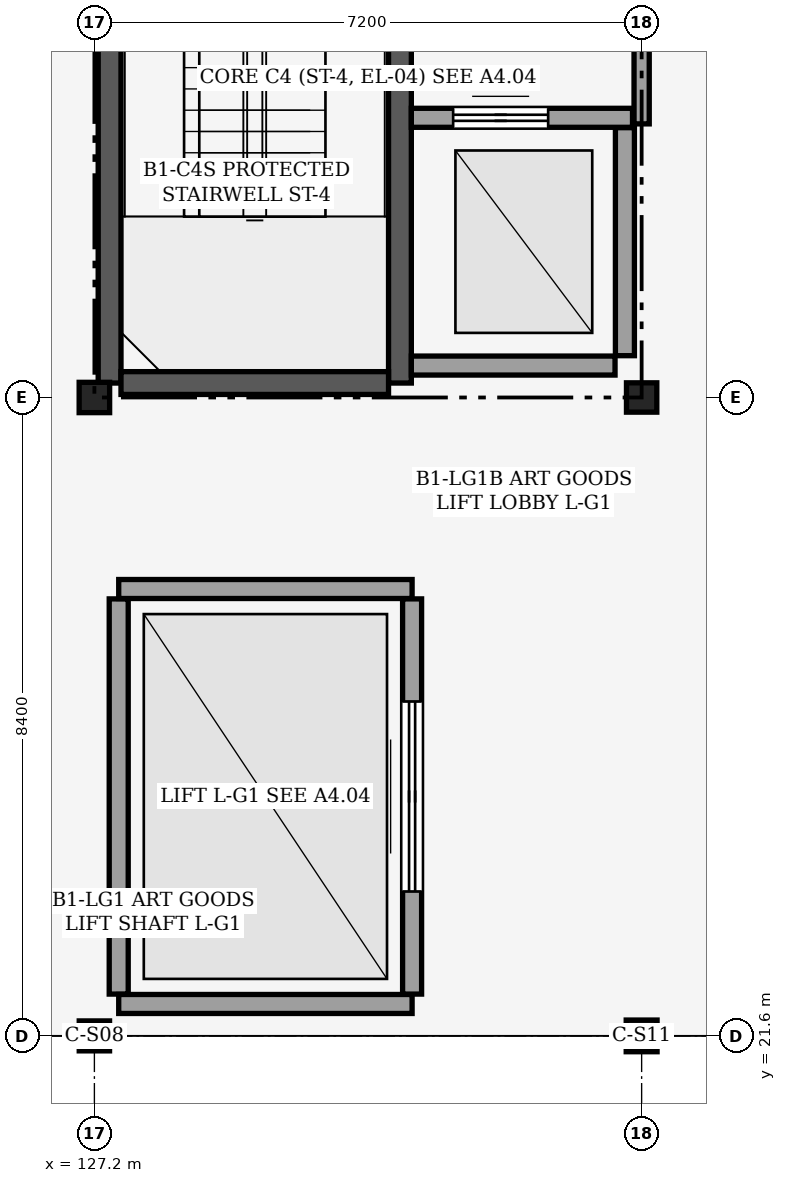
"""IFC4 building model, lengths in metres.
Left out: names, types, materials, properties, quantities, classifications, styles, units other than length and angle.
Written with IfcOpenShell. Run it as: python <this file> out.ifc"""

import sys

from ifc_helpers import new_model, si_unit, direction, frame, frame_2d, origin, origin_2d, place, context, subcontext, project, spatial, rectangle, i_section, extrude, element, fill, save


model = new_model("IFC4")
c1 = context("Model", 3, precision=1e-05, world=origin(), true_north=direction((0.0, 1.0)))
c2 = subcontext(c1, "Body", "Model", "MODEL_VIEW")
j1 = project(units=[si_unit("LENGTHUNIT", "METRE"), si_unit("PLANEANGLEUNIT", "RADIAN")], contexts=[c1])
p1 = place(None, origin())
s1 = spatial("IfcSite", under=j1, at=p1, CompositionType="ELEMENT")
p2 = place(p1, origin())
s2 = spatial("IfcBuilding", under=s1, at=p2, CompositionType="ELEMENT")
p3 = place(p2, frame((0.0, 0.0, -5.4)))
s3 = spatial("IfcBuildingStorey", under=s2, at=p3, CompositionType="ELEMENT", Elevation=-5.4)
p4 = place(p3, frame((127.2, 21.6, 0.0), z_axis=(0.0, 0.0, 1.0), x_axis=(1.0, 0.0, 0.0)))
e1 = element("IfcColumn", 1, at=p4, inside=s3, PredefinedType="COLUMN", context=c2, shape_type="SweptSolid", body=[
    extrude(i_section(OverallWidth=0.399, OverallDepth=0.394, WebThickness=0.023, FlangeThickness=0.037, FilletRadius=0.025, at=origin_2d()), origin(), (0.0, 0.0, 1.0), 5.4),
])
p5 = place(p3, frame((127.2, 30.0, 0.0), z_axis=(0.0, 0.0, 1.0), x_axis=(1.0, 0.0, 0.0)))
e2 = element("IfcColumn", 2, at=p5, inside=s3, PredefinedType="COLUMN", context=c2, shape_type="SweptSolid", body=[
    extrude(i_section(OverallWidth=0.401, OverallDepth=0.399, WebThickness=0.025, FlangeThickness=0.04, FilletRadius=0.025, at=origin_2d()), origin(), (0.0, 0.0, 1.0), 5.4),
])
p6 = place(p3, frame((134.4, 21.6, 0.0), z_axis=(0.0, 0.0, 1.0), x_axis=(1.0, 0.0, 0.0)))
e3 = element("IfcColumn", 3, at=p6, inside=s3, PredefinedType="COLUMN", context=c2, shape_type="SweptSolid", body=[
    extrude(i_section(OverallWidth=0.406, OverallDepth=0.417, WebThickness=0.03, FlangeThickness=0.048, FilletRadius=0.025, at=origin_2d()), origin(), (0.0, 0.0, 1.0), 5.4),
])
p7 = place(p3, frame((134.4, 30.0, 0.0), z_axis=(0.0, 0.0, 1.0), x_axis=(1.0, 0.0, 0.0)))
e4 = element("IfcColumn", 4, at=p7, inside=s3, PredefinedType="COLUMN", context=c2, shape_type="SweptSolid", body=[
    extrude(i_section(OverallWidth=0.399, OverallDepth=0.386, WebThickness=0.021, FlangeThickness=0.033, FilletRadius=0.025, at=origin_2d()), origin(), (0.0, 0.0, 1.0), 5.4),
])
p8 = place(p3, frame((127.4, 30.19, 0.0), z_axis=(0.0, 0.0, 1.0), x_axis=(0.0, 1.0, 0.0)))
e5 = element("IfcWall", 5, at=p8, inside=s3, PredefinedType="SHEAR", context=c2, shape_type="SweptSolid", body=[
    extrude(rectangle(XDim=8.02, YDim=0.3, at=frame_2d((4.01, 0.0))), origin(), (0.0, 0.0, 1.0), 5.12),
])
p9 = place(p3, frame((131.22, 30.19, 0.0), z_axis=(0.0, 0.0, 1.0), x_axis=(0.0, 1.0, 0.0)))
e6 = element("IfcWall", 6, at=p9, inside=s3, PredefinedType="SHEAR", context=c2, shape_type="SweptSolid", body=[
    extrude(rectangle(XDim=8.02, YDim=0.3, at=frame_2d((4.01, 0.0))), origin(), (0.0, 0.0, 1.0), 5.12),
])
p10 = place(p9, frame((6.47, 0.0, 0.0)))
e7 = element("IfcOpeningElement", 7, at=p10, cuts=e6, PredefinedType="OPENING", context=c2, shape_type="SweptSolid", body=[
    extrude(rectangle(XDim=1.1, YDim=2.15, at=frame_2d((0.55, 1.075))), frame((0.0, 0.16, 0.0), z_axis=(0.0, -1.0, 0.0), x_axis=(1.0, 0.0, 0.0)), (0.0, 0.0, 1.0), 0.321),
])
p11 = place(p3, frame((127.55, 30.19, 0.0), z_axis=(0.0, 0.0, 1.0), x_axis=(1.0, 0.0, 0.0)))
e8 = element("IfcWall", 8, at=p11, inside=s3, PredefinedType="SHEAR", context=c2, shape_type="SweptSolid", body=[
    extrude(rectangle(XDim=3.52, YDim=0.3, at=frame_2d((1.76, 0.0))), origin(), (0.0, 0.0, 1.0), 5.12),
])
p12 = place(p3, frame((131.37, 30.42, 0.0), z_axis=(0.0, 0.0, 1.0), x_axis=(1.0, 0.0, 0.0)))
e9 = element("IfcWall", 9, at=p12, inside=s3, PredefinedType="PARTITIONING", context=c2, shape_type="SweptSolid", body=[
    extrude(rectangle(XDim=2.68, YDim=0.25, at=frame_2d((1.34, 0.0))), origin(), (0.0, 0.0, 1.0), 5.12),
])
p13 = place(p3, frame((134.18, 30.55, 0.0), z_axis=(0.0, 0.0, 1.0), x_axis=(0.0, 1.0, 0.0)))
e10 = element("IfcWall", 10, at=p13, inside=s3, PredefinedType="PARTITIONING", context=c2, shape_type="SweptSolid", body=[
    extrude(rectangle(XDim=3.0, YDim=0.25, at=frame_2d((1.5, 0.0))), origin(), (0.0, 0.0, 1.0), 4.173),
])
p14 = place(p3, frame((131.37, 33.68, 0.0), z_axis=(0.0, 0.0, 1.0), x_axis=(1.0, 0.0, 0.0)))
e11 = element("IfcWall", 11, at=p14, inside=s3, PredefinedType="PARTITIONING", context=c2, shape_type="SweptSolid", body=[
    extrude(rectangle(XDim=2.91, YDim=0.25, at=frame_2d((1.455, 0.0))), origin(), (0.0, 0.0, 1.0), 5.12),
])
p15 = place(p14, frame((0.55, 0.0, 0.0)))
e12 = element("IfcOpeningElement", 12, at=p15, cuts=e11, PredefinedType="OPENING", context=c2, shape_type="SweptSolid", body=[
    extrude(rectangle(XDim=1.25, YDim=2.15, at=frame_2d((0.625, 1.075))), frame((0.0, 0.135, 0.0), z_axis=(0.0, -1.0, 0.0), x_axis=(1.0, 0.0, 0.0)), (0.0, 0.0, 1.0), 0.271),
])
p16 = place(p3, frame((134.4, 33.6, 0.0), z_axis=(0.0, 0.0, 1.0), x_axis=(0.0, 1.0, 0.0)))
e13 = element("IfcWall", 13, at=p16, inside=s3, PredefinedType="PARTITIONING", context=c2, shape_type="SweptSolid", body=[
    extrude(rectangle(XDim=4.58, YDim=0.2, at=frame_2d((2.29, 0.0))), origin(), (0.0, 0.0, 1.0), 4.173),
])
p17 = place(p3, frame((127.52, 22.15, 0.0), z_axis=(0.0, 0.0, 1.0), x_axis=(0.0, 1.0, 0.0)))
e14 = element("IfcWall", 14, at=p17, inside=s3, PredefinedType="PARTITIONING", context=c2, shape_type="SweptSolid", body=[
    extrude(rectangle(XDim=5.2, YDim=0.25, at=frame_2d((2.6, 0.0))), origin(), (0.0, 0.0, 1.0), 4.328),
])
for number, where, z_axis, x_axis in (
    (15, (127.52, 27.48, 0.0), (0.0, 0.0, 1.0), (1.0, 0.0, 0.0)),
    (16, (127.52, 22.02, 0.0), (0.0, 0.0, 1.0), (1.0, 0.0, 0.0)),
):
    element("IfcWall", number, at=place(p3, frame(where, z_axis=z_axis, x_axis=x_axis)), inside=s3, PredefinedType="PARTITIONING", context=c2, shape_type="SweptSolid", body=[
        extrude(rectangle(XDim=3.86, YDim=0.25, at=frame_2d((1.93, 0.0))), origin(), (0.0, 0.0, 1.0), 5.12),
    ])
p18 = place(p3, frame((131.38, 22.15, 0.0), z_axis=(0.0, 0.0, 1.0), x_axis=(0.0, 1.0, 0.0)))
e17 = element("IfcWall", 17, at=p18, inside=s3, PredefinedType="PARTITIONING", context=c2, shape_type="SweptSolid", body=[
    extrude(rectangle(XDim=5.2, YDim=0.25, at=frame_2d((2.6, 0.0))), origin(), (0.0, 0.0, 1.0), 5.12),
])
p19 = place(p18, frame((1.35, 0.0, 0.0)))
e18 = element("IfcOpeningElement", 18, at=p19, cuts=e17, PredefinedType="OPENING", context=c2, shape_type="SweptSolid", body=[
    extrude(rectangle(XDim=2.5, YDim=2.6, at=frame_2d((1.25, 1.3))), frame((0.0, 0.135, 0.0), z_axis=(0.0, -1.0, 0.0), x_axis=(1.0, 0.0, 0.0)), (0.0, 0.0, 1.0), 0.271),
])
p20 = place(p15, origin())
e19 = element("IfcDoor", 19, at=p20, inside=s3, OperationType="DOUBLE_DOOR_SLIDING", PredefinedType="DOOR", context=c2, shape_type="SweptSolid", body=[
    extrude(rectangle(XDim=1.25, YDim=2.15, at=frame_2d((0.625, 1.075))), frame((0.0, 0.025, 0.0), z_axis=(0.0, -1.0, 0.0), x_axis=(1.0, 0.0, 0.0)), (0.0, 0.0, 1.0), 0.05),
])
fill(e12, e19)
p21 = place(p19, origin())
e20 = element("IfcDoor", 20, at=p21, inside=s3, OperationType="DOUBLE_DOOR_SLIDING", PredefinedType="DOOR", context=c2, shape_type="SweptSolid", body=[
    extrude(rectangle(XDim=2.5, YDim=2.6, at=frame_2d((1.25, 1.3))), frame((0.0, 0.025, 0.0), z_axis=(0.0, -1.0, 0.0), x_axis=(1.0, 0.0, 0.0)), (0.0, 0.0, 1.0), 0.05),
])
fill(e18, e20)
save(model, sys.argv[1])
